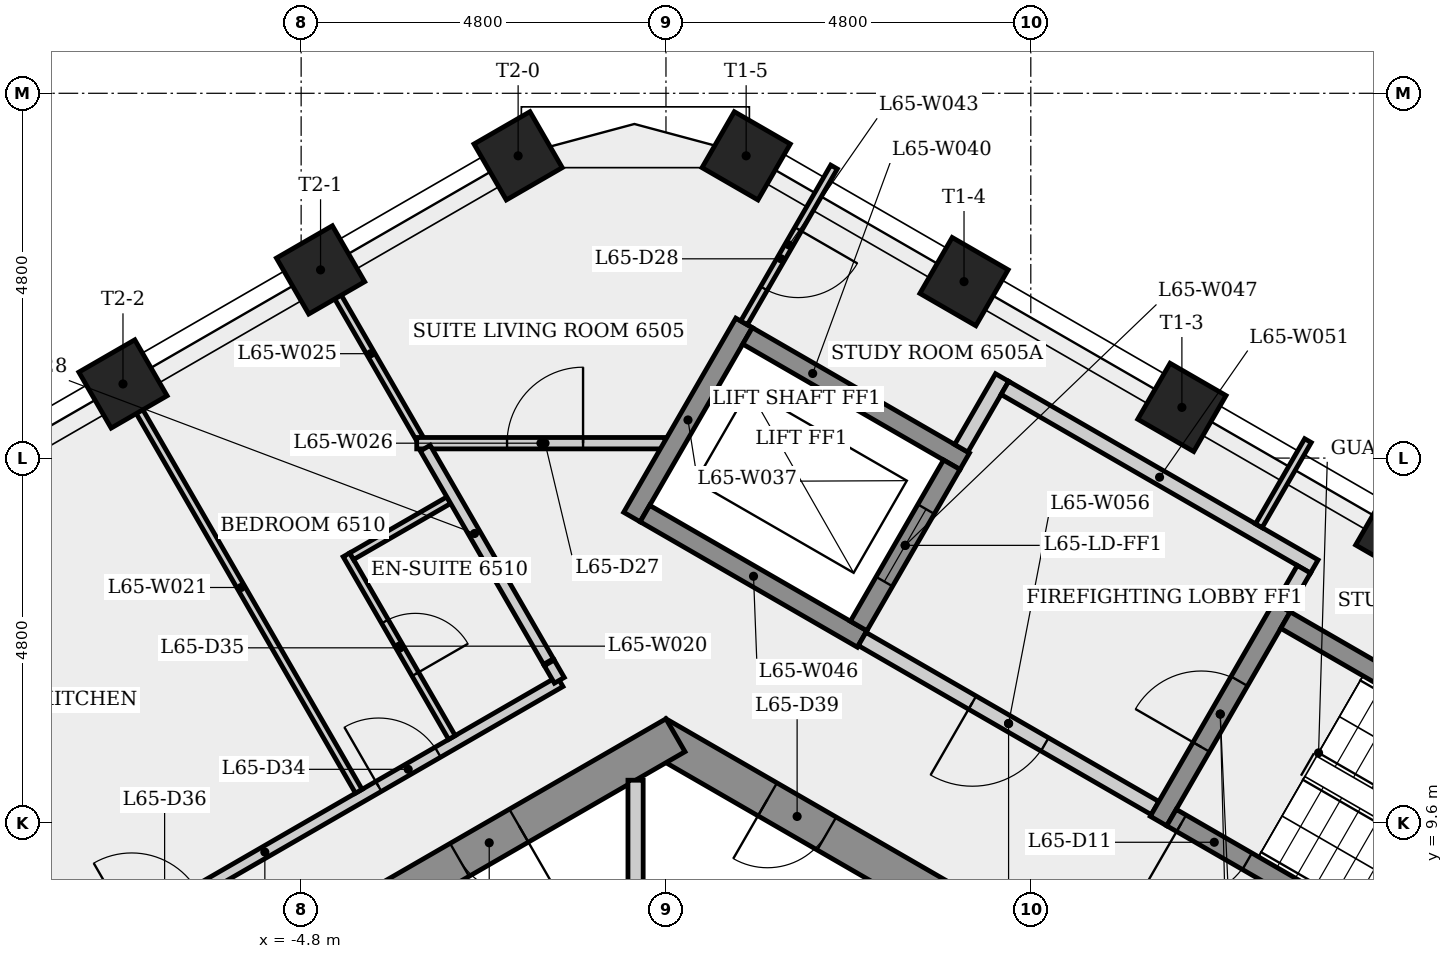
"""IFC4 building model, lengths in metres.
Left out: names, types, materials, properties, quantities, classifications, styles, units other than length and angle.
Written with IfcOpenShell. Run it as: python <this file> out.ifc"""

import sys

from ifc_helpers import new_model, si_unit, direction, frame, frame_2d, origin, origin_2d, place, context, subcontext, project, spatial, rectangle, extrude, element, fill, save


model = new_model("IFC4")
c1 = context("Model", 3, precision=1e-05, world=origin(), true_north=direction((0.0, 1.0)))
c2 = subcontext(c1, "Body", "Model", "MODEL_VIEW")
j1 = project(units=[si_unit("LENGTHUNIT", "METRE"), si_unit("PLANEANGLEUNIT", "RADIAN")], contexts=[c1])
p1 = place(None, origin())
s1 = spatial("IfcSite", under=j1, at=p1, CompositionType="ELEMENT")
p2 = place(p1, origin())
s2 = spatial("IfcBuilding", under=s1, at=p2, CompositionType="ELEMENT")
p3 = place(p2, frame((0.0, 0.0, 242.7)))
s3 = spatial("IfcBuildingStorey", under=s2, at=p3, CompositionType="ELEMENT", Elevation=242.7)
p4 = place(p3, frame((9.375, 5.268, 0.0), z_axis=(0.0, 0.0, 1.0), x_axis=(-0.866023993627, 0.500002442456, 0.0)))
e1 = element("IfcWall", 1, at=p4, inside=s3, PredefinedType="SHEAR", context=c2, shape_type="SweptSolid", body=[
    extrude(rectangle(XDim=10.97, YDim=0.5, at=frame_2d((5.485, 0.0))), origin(), (0.0, 0.0, 1.0), 3.4),
])
p5 = place(p4, frame((8.383, 0.0, 0.0)))
e2 = element("IfcOpeningElement", 2, at=p5, cuts=e1, PredefinedType="OPENING", context=c2, shape_type="SweptSolid", body=[
    extrude(rectangle(XDim=0.9, YDim=2.1, at=frame_2d((0.45, 1.05))), frame((0.0, 0.26, 0.0), z_axis=(0.0, -1.0, 0.0), x_axis=(1.0, 0.0, 0.0)), (0.0, 0.0, 1.0), 0.52),
])
p6 = place(p4, frame((3.165, 0.0, 0.0)))
e3 = element("IfcOpeningElement", 3, at=p6, cuts=e1, PredefinedType="OPENING", context=c2, shape_type="SweptSolid", body=[
    extrude(rectangle(XDim=0.9, YDim=2.1, at=frame_2d((0.45, 1.05))), frame((0.0, 0.26, 0.0), z_axis=(0.0, -1.0, 0.0), x_axis=(1.0, 0.0, 0.0)), (0.0, 0.0, 1.0), 0.52),
])
p7 = place(p3, frame((0.125, 10.753, 0.0), z_axis=(0.0, 0.0, 1.0), x_axis=(-0.866023993627, -0.500002442456, 0.0)))
e4 = element("IfcWall", 4, at=p7, inside=s3, PredefinedType="SHEAR", context=c2, shape_type="SweptSolid", body=[
    extrude(rectangle(XDim=10.97, YDim=0.5, at=frame_2d((5.485, 0.0))), origin(), (0.0, 0.0, 1.0), 3.4),
])
p8 = place(p7, frame((9.043, 0.0, 0.0)))
e5 = element("IfcOpeningElement", 5, at=p8, cuts=e4, PredefinedType="OPENING", context=c2, shape_type="SweptSolid", body=[
    extrude(rectangle(XDim=0.9, YDim=2.1, at=frame_2d((0.45, 1.05))), frame((0.0, 0.26, 0.0), z_axis=(0.0, -1.0, 0.0), x_axis=(1.0, 0.0, 0.0)), (0.0, 0.0, 1.0), 0.52),
])
p9 = place(p7, frame((2.38, 0.0, 0.0)))
e6 = element("IfcOpeningElement", 6, at=p9, cuts=e4, PredefinedType="OPENING", context=c2, shape_type="SweptSolid", body=[
    extrude(rectangle(XDim=0.9, YDim=2.1, at=frame_2d((0.45, 1.05))), frame((0.0, 0.26, 0.0), z_axis=(0.0, -1.0, 0.0), x_axis=(1.0, 0.0, 0.0)), (0.0, 0.0, 1.0), 0.52),
])
for number, where, z_axis, x_axis in (
    (7, (9.655, 13.412, 0.0), (0.0, 0.0, 1.0), (0.5, 0.866, 0.0)),
    (8, (6.788, 15.067, 0.0), (0.0, 0.0, 1.0), (0.5, 0.866, 0.0)),
    (9, (3.921, 16.722, 0.0), (0.0, 0.0, 1.0), (0.5, 0.866, 0.0)),
    (10, (1.055, 18.377, 0.0), (0.0, 0.0, 1.0), (0.5, 0.866, 0.0)),
    (11, (-1.945, 18.377, 0.0), (0.0, 0.0, 1.0), (-0.5, 0.866, 0.0)),
    (12, (-4.545, 16.876, 0.0), (0.0, 0.0, 1.0), (-0.5, 0.866, 0.0)),
    (13, (-7.144, 15.375, 0.0), (0.0, 0.0, 1.0), (-0.5, 0.866, 0.0)),
):
    element("IfcColumn", number, at=place(p3, frame(where, z_axis=z_axis, x_axis=x_axis)), inside=s3, PredefinedType="COLUMN", context=c2, shape_type="SweptSolid", body=[
        extrude(rectangle(XDim=0.85, YDim=0.85, at=origin_2d()), origin(), (0.0, 0.0, 1.0), 3.4),
    ])
p10 = place(p3, frame((-9.162, 6.973, 0.0), z_axis=(0.0, 0.0, 1.0), x_axis=(0.866025611375, 0.499999640442, 0.0)))
e14 = element("IfcWall", 14, at=p10, inside=s3, PredefinedType="PARTITIONING", context=c2, shape_type="SweptSolid", body=[
    extrude(rectangle(XDim=8.971, YDim=0.15, at=frame_2d((4.486, 0.0))), origin(), (0.0, 0.0, 1.0), 3.05),
])
p11 = place(p10, frame((6.213, 0.0, 0.0)))
e15 = element("IfcOpeningElement", 15, at=p11, cuts=e14, PredefinedType="OPENING", context=c2, shape_type="SweptSolid", body=[
    extrude(rectangle(XDim=0.9, YDim=2.1, at=frame_2d((0.45, 1.05))), frame((0.0, 0.085, 0.0), z_axis=(0.0, -1.0, 0.0), x_axis=(1.0, 0.0, 0.0)), (0.0, 0.0, 1.0), 0.17),
])
p12 = place(p10, frame((2.463, 0.0, 0.0)))
e16 = element("IfcOpeningElement", 16, at=p12, cuts=e14, PredefinedType="OPENING", context=c2, shape_type="SweptSolid", body=[
    extrude(rectangle(XDim=1.0, YDim=2.1, at=frame_2d((0.5, 1.05))), frame((0.0, 0.085, 0.0), z_axis=(0.0, -1.0, 0.0), x_axis=(1.0, 0.0, 0.0)), (0.0, 0.0, 1.0), 0.17),
])
p13 = place(p3, frame((-4.204, 13.127, 0.0), z_axis=(0.0, 0.0, 1.0), x_axis=(0.50000932403, -0.866020020486, 0.0)))
e17 = element("IfcWall", 17, at=p13, inside=s3, PredefinedType="PARTITIONING", context=c2, shape_type="SweptSolid", body=[
    extrude(rectangle(XDim=2.775, YDim=0.1, at=frame_2d((1.387, 0.0))), origin(), (0.0, 0.0, 1.0), 3.05),
])
p14 = place(p13, frame((1.012, 0.0, 0.0)))
e18 = element("IfcOpeningElement", 18, at=p14, cuts=e17, PredefinedType="OPENING", context=c2, shape_type="SweptSolid", body=[
    extrude(rectangle(XDim=0.8, YDim=2.1, at=frame_2d((0.4, 1.05))), frame((0.0, 0.06, 0.0), z_axis=(0.0, -1.0, 0.0), x_axis=(1.0, 0.0, 0.0)), (0.0, 0.0, 1.0), 0.12),
])
p15 = place(p3, frame((-4.042, 10.016, 0.0), z_axis=(0.0, 0.0, 1.0), x_axis=(-0.500027320894, 0.866009629484, 0.0)))
e19 = element("IfcWall", 19, at=p15, inside=s3, PredefinedType="PARTITIONING", context=c2, shape_type="SweptSolid", body=[
    extrude(rectangle(XDim=6.193, YDim=0.1, at=frame_2d((3.096, 0.0))), origin(), (0.0, 0.0, 1.0), 3.05),
])
p16 = place(p3, frame((-3.242, 14.661, 0.0), z_axis=(0.0, 0.0, 1.0), x_axis=(-0.499991089772, 0.866030548046, 0.0)))
e20 = element("IfcWall", 20, at=p16, inside=s3, PredefinedType="PARTITIONING", context=c2, shape_type="SweptSolid", body=[
    extrude(rectangle(XDim=2.57, YDim=0.1, at=frame_2d((1.285, 0.0))), origin(), (0.0, 0.0, 1.0), 3.05),
])
p17 = place(p3, frame((-3.279, 14.596, 0.0), z_axis=(0.0, 0.0, 1.0), x_axis=(1.0, 0.0, 0.0)))
e21 = element("IfcWall", 21, at=p17, inside=s3, PredefinedType="PARTITIONING", context=c2, shape_type="SweptSolid", body=[
    extrude(rectangle(XDim=3.268, YDim=0.15, at=frame_2d((1.634, 0.0))), origin(), (0.0, 0.0, 1.0), 3.05),
])
p18 = place(p17, frame((1.189, 0.0, 0.0)))
e22 = element("IfcOpeningElement", 22, at=p18, cuts=e21, PredefinedType="OPENING", context=c2, shape_type="SweptSolid", body=[
    extrude(rectangle(XDim=1.0, YDim=2.1, at=frame_2d((0.5, 1.05))), frame((0.0, 0.085, 0.0), z_axis=(0.0, -1.0, 0.0), x_axis=(1.0, 0.0, 0.0)), (0.0, 0.0, 1.0), 0.17),
])
p19 = place(p3, frame((-2.858, 13.846, 0.0), z_axis=(0.0, 0.0, 1.0), x_axis=(-0.866003658127, -0.500037662692, 0.0)))
e23 = element("IfcWall", 23, at=p19, inside=s3, PredefinedType="PARTITIONING", context=c2, shape_type="SweptSolid", body=[
    extrude(rectangle(XDim=1.475, YDim=0.1, at=frame_2d((0.738, 0.0))), origin(), (0.0, 0.0, 1.0), 3.05),
])
p20 = place(p3, frame((-3.167, 14.531, 0.0), z_axis=(0.0, 0.0, 1.0), x_axis=(0.500017912207, -0.86601506192, 0.0)))
e24 = element("IfcWall", 24, at=p20, inside=s3, PredefinedType="PARTITIONING", context=c2, shape_type="SweptSolid", body=[
    extrude(rectangle(XDim=3.243, YDim=0.15, at=frame_2d((1.621, 0.0))), origin(), (0.0, 0.0, 1.0), 3.05),
])
p21 = place(p3, frame((-1.536, 11.706, 0.0), z_axis=(0.0, 0.0, 1.0), x_axis=(0.500200859313, -0.865909406545, 0.0)))
e25 = element("IfcWall", 25, at=p21, inside=s3, PredefinedType="PARTITIONING", context=c2, shape_type="SweptSolid", body=[
    extrude(rectangle(XDim=0.265, YDim=0.15, at=frame_2d((0.133, 0.0))), origin(), (0.0, 0.0, 1.0), 3.05),
])
p22 = place(p3, frame((-0.4, 10.161, 0.0), z_axis=(0.0, 0.0, 1.0), x_axis=(0.0, -1.0, 0.0)))
e26 = element("IfcWall", 26, at=p22, inside=s3, PredefinedType="PARTITIONING", context=c2, shape_type="SweptSolid", body=[
    extrude(rectangle(XDim=4.886, YDim=0.2, at=frame_2d((2.443, 0.0))), origin(), (0.0, 0.0, 1.0), 3.05),
])
p23 = place(p3, frame((-0.448, 13.624, 0.0), z_axis=(0.0, 0.0, 1.0), x_axis=(0.500037662692, 0.866003658127, 0.0)))
e27 = element("IfcWall", 27, at=p23, inside=s3, PredefinedType="SHEAR", context=c2, shape_type="SweptSolid", body=[
    extrude(rectangle(XDim=2.95, YDim=0.25, at=frame_2d((1.475, 0.0))), origin(), (0.0, 0.0, 1.0), 3.05),
])
p24 = place(p3, frame((1.073, 16.008, 0.0), z_axis=(0.0, 0.0, 1.0), x_axis=(0.866040211805, -0.499974350878, 0.0)))
e28 = element("IfcWall", 28, at=p24, inside=s3, PredefinedType="SHEAR", context=c2, shape_type="SweptSolid", body=[
    extrude(rectangle(XDim=3.3, YDim=0.25, at=frame_2d((1.65, 0.0))), origin(), (0.0, 0.0, 1.0), 3.05),
])
p25 = place(p3, frame((2.211, 18.23, 0.0), z_axis=(0.0, 0.0, 1.0), x_axis=(-0.50001992892, -0.866013897511, 0.0)))
e29 = element("IfcWall", 29, at=p25, inside=s3, PredefinedType="PARTITIONING", context=c2, shape_type="SweptSolid", body=[
    extrude(rectangle(XDim=2.368, YDim=0.1, at=frame_2d((1.184, 0.0))), origin(), (0.0, 0.0, 1.0), 3.05),
])
p26 = place(p25, frame((0.945, 0.0, 0.0)))
e30 = element("IfcOpeningElement", 30, at=p26, cuts=e29, PredefinedType="OPENING", context=c2, shape_type="SweptSolid", body=[
    extrude(rectangle(XDim=0.9, YDim=2.1, at=frame_2d((0.45, 1.05))), frame((0.0, 0.06, 0.0), z_axis=(0.0, -1.0, 0.0), x_axis=(1.0, 0.0, 0.0)), (0.0, 0.0, 1.0), 0.12),
])
p27 = place(p3, frame((2.581, 12.02, 0.0), z_axis=(0.0, 0.0, 1.0), x_axis=(-0.866040211805, 0.499974350878, 0.0)))
e31 = element("IfcWall", 31, at=p27, inside=s3, PredefinedType="SHEAR", context=c2, shape_type="SweptSolid", body=[
    extrude(rectangle(XDim=3.3, YDim=0.25, at=frame_2d((1.65, 0.0))), origin(), (0.0, 0.0, 1.0), 3.05),
])
p28 = place(p3, frame((2.535, 12.191, 0.0), z_axis=(0.0, 0.0, 1.0), x_axis=(0.500061746146, 0.865989751695, 0.0)))
e32 = element("IfcWall", 32, at=p28, inside=s3, PredefinedType="SHEAR", context=c2, shape_type="SweptSolid", body=[
    extrude(rectangle(XDim=2.45, YDim=0.25, at=frame_2d((1.225, 0.0))), origin(), (0.0, 0.0, 1.0), 3.4),
])
p29 = place(p28, frame((0.675, 0.0, 0.0)))
e33 = element("IfcOpeningElement", 33, at=p29, cuts=e32, PredefinedType="OPENING", context=c2, shape_type="SweptSolid", body=[
    extrude(rectangle(XDim=1.1, YDim=2.1, at=frame_2d((0.55, 1.05))), frame((0.0, 0.135, 0.0), z_axis=(0.0, -1.0, 0.0), x_axis=(1.0, 0.0, 0.0)), (0.0, 0.0, 1.0), 0.27),
])
p30 = place(p3, frame((3.885, 14.529, 0.0), z_axis=(0.0, 0.0, 1.0), x_axis=(0.499997628298, 0.866026773083, 0.0)))
e34 = element("IfcWall", 34, at=p30, inside=s3, PredefinedType="PARTITIONING", context=c2, shape_type="SweptSolid", body=[
    extrude(rectangle(XDim=1.075, YDim=0.2, at=frame_2d((0.538, 0.0))), origin(), (0.0, 0.0, 1.0), 3.05),
])
p31 = place(p3, frame((4.459, 15.323, 0.0), z_axis=(0.0, 0.0, 1.0), x_axis=(0.866016039709, -0.500016218704, 0.0)))
e35 = element("IfcWall", 35, at=p31, inside=s3, PredefinedType="PARTITIONING", context=c2, shape_type="SweptSolid", body=[
    extrude(rectangle(XDim=4.7, YDim=0.2, at=frame_2d((2.35, 0.0))), origin(), (0.0, 0.0, 1.0), 3.05),
])
p32 = place(p3, frame((6.435, 9.795, 0.0), z_axis=(0.0, 0.0, 1.0), x_axis=(-0.866012907634, 0.500021643343, 0.0)))
e36 = element("IfcWall", 36, at=p32, inside=s3, PredefinedType="PARTITIONING", context=c2, shape_type="SweptSolid", body=[
    extrude(rectangle(XDim=4.45, YDim=0.2, at=frame_2d((2.225, 0.0))), origin(), (0.0, 0.0, 1.0), 3.05),
])
p33 = place(p32, frame((1.675, 0.0, 0.0)))
e37 = element("IfcOpeningElement", 37, at=p33, cuts=e36, PredefinedType="OPENING", context=c2, shape_type="SweptSolid", body=[
    extrude(rectangle(XDim=1.1, YDim=2.1, at=frame_2d((0.55, 1.05))), frame((0.0, 0.11, 0.0), z_axis=(0.0, -1.0, 0.0), x_axis=(1.0, 0.0, 0.0)), (0.0, 0.0, 1.0), 0.22),
])
p34 = place(p3, frame((6.48, 9.624, 0.0), z_axis=(0.0, 0.0, 1.0), x_axis=(0.500017246033, 0.866015446554, 0.0)))
e38 = element("IfcWall", 38, at=p34, inside=s3, PredefinedType="SHEAR", context=c2, shape_type="SweptSolid", body=[
    extrude(rectangle(XDim=3.25, YDim=0.25, at=frame_2d((1.625, 0.0))), origin(), (0.0, 0.0, 1.0), 3.05),
])
p35 = place(p34, frame((1.125, 0.0, 0.0)))
e39 = element("IfcOpeningElement", 39, at=p35, cuts=e38, PredefinedType="OPENING", context=c2, shape_type="SweptSolid", body=[
    extrude(rectangle(XDim=1.0, YDim=2.1, at=frame_2d((0.5, 1.05))), frame((0.0, 0.135, 0.0), z_axis=(0.0, -1.0, 0.0), x_axis=(1.0, 0.0, 0.0)), (0.0, 0.0, 1.0), 0.27),
])
p36 = place(p3, frame((7.8, 13.51, 0.0), z_axis=(0.0, 0.0, 1.0), x_axis=(0.499956713172, 0.866050394004, 0.0)))
e40 = element("IfcWall", 40, at=p36, inside=s3, PredefinedType="PARTITIONING", context=c2, shape_type="SweptSolid", body=[
    extrude(rectangle(XDim=1.293, YDim=0.1, at=frame_2d((0.646, 0.0))), origin(), (0.0, 0.0, 1.0), 3.05),
])
p37 = place(p3, frame((8.151, 12.268, 0.0), z_axis=(0.0, 0.0, 1.0), x_axis=(0.866025499775, -0.499999833739, 0.0)))
e41 = element("IfcWall", 41, at=p37, inside=s3, PredefinedType="SHEAR", context=c2, shape_type="SweptSolid", body=[
    extrude(rectangle(XDim=6.4, YDim=0.25, at=frame_2d((3.2, 0.0))), origin(), (0.0, 0.0, 1.0), 3.05),
])
p38 = place(p3, frame((8.393, 12.937, 0.0), z_axis=(0.0, 0.0, 1.0), x_axis=(-0.500065409566, -0.86598763626, 0.0)))
e42 = element("IfcWall", 42, at=p38, inside=s3, PredefinedType="PARTITIONING", context=c2, shape_type="SweptSolid", body=[
    extrude(rectangle(XDim=0.575, YDim=0.2, at=frame_2d((0.288, 0.0))), origin(), (0.0, 0.0, 1.0), 3.05),
])
p39 = place(p3, frame((12.194, 6.47, 0.0), z_axis=(0.0, 0.0, 1.0), x_axis=(-0.866025499775, 0.499999833739, 0.0)))
e43 = element("IfcWall", 43, at=p39, inside=s3, PredefinedType="SHEAR", context=c2, shape_type="SweptSolid", body=[
    extrude(rectangle(XDim=6.4, YDim=0.25, at=frame_2d((3.2, 0.0))), origin(), (0.0, 0.0, 1.0), 3.05),
])
p40 = place(p39, frame((5.25, 0.0, 0.0)))
e44 = element("IfcOpeningElement", 44, at=p40, cuts=e43, PredefinedType="OPENING", context=c2, shape_type="SweptSolid", body=[
    extrude(rectangle(XDim=1.0, YDim=2.1, at=frame_2d((0.5, 1.05))), frame((0.0, 0.135, 0.0), z_axis=(0.0, -1.0, 0.0), x_axis=(1.0, 0.0, 0.0)), (0.0, 0.0, 1.0), 0.27),
])
p41 = place(p40, origin())
e45 = element("IfcDoor", 45, at=p41, inside=s3, OperationType="SINGLE_SWING_RIGHT", PredefinedType="DOOR", context=c2, shape_type="SweptSolid", body=[
    extrude(rectangle(XDim=1.0, YDim=2.1, at=frame_2d((0.5, 1.05))), frame((0.0, 0.025, 0.0), z_axis=(0.0, -1.0, 0.0), x_axis=(1.0, 0.0, 0.0)), (0.0, 0.0, 1.0), 0.05),
])
fill(e44, e45)
p42 = place(p35, origin())
e46 = element("IfcDoor", 46, at=p42, inside=s3, OperationType="SINGLE_SWING_LEFT", PredefinedType="DOOR", context=c2, shape_type="SweptSolid", body=[
    extrude(rectangle(XDim=1.0, YDim=2.1, at=frame_2d((0.5, 1.05))), frame((0.0, 0.025, 0.0), z_axis=(0.0, -1.0, 0.0), x_axis=(1.0, 0.0, 0.0)), (0.0, 0.0, 1.0), 0.05),
])
fill(e39, e46)
p43 = place(p33, origin())
e47 = element("IfcDoor", 47, at=p43, inside=s3, OperationType="SINGLE_SWING_RIGHT", PredefinedType="DOOR", context=c2, shape_type="SweptSolid", body=[
    extrude(rectangle(XDim=1.1, YDim=2.1, at=frame_2d((0.55, 1.05))), frame((0.0, 0.025, 0.0), z_axis=(0.0, -1.0, 0.0), x_axis=(1.0, 0.0, 0.0)), (0.0, 0.0, 1.0), 0.05),
])
fill(e37, e47)
p44 = place(p29, origin())
e48 = element("IfcDoor", 48, at=p44, inside=s3, OperationType="SLIDING_TO_LEFT", PredefinedType="DOOR", context=c2, shape_type="SweptSolid", body=[
    extrude(rectangle(XDim=1.1, YDim=2.1, at=frame_2d((0.55, 1.05))), frame((0.0, 0.025, 0.0), z_axis=(0.0, -1.0, 0.0), x_axis=(1.0, 0.0, 0.0)), (0.0, 0.0, 1.0), 0.05),
])
fill(e33, e48)
p45 = place(p18, origin())
e49 = element("IfcDoor", 49, at=p45, inside=s3, OperationType="SINGLE_SWING_RIGHT", PredefinedType="DOOR", context=c2, shape_type="SweptSolid", body=[
    extrude(rectangle(XDim=1.0, YDim=2.1, at=frame_2d((0.5, 1.05))), frame((0.0, 0.025, 0.0), z_axis=(0.0, -1.0, 0.0), x_axis=(1.0, 0.0, 0.0)), (0.0, 0.0, 1.0), 0.05),
])
fill(e22, e49)
p46 = place(p26, origin())
e50 = element("IfcDoor", 50, at=p46, inside=s3, OperationType="SINGLE_SWING_LEFT", PredefinedType="DOOR", context=c2, shape_type="SweptSolid", body=[
    extrude(rectangle(XDim=0.9, YDim=2.1, at=frame_2d((0.45, 1.05))), frame((0.0, 0.025, 0.0), z_axis=(0.0, -1.0, 0.0), x_axis=(1.0, 0.0, 0.0)), (0.0, 0.0, 1.0), 0.05),
])
fill(e30, e50)
p47 = place(p11, origin())
e51 = element("IfcDoor", 51, at=p47, inside=s3, OperationType="SINGLE_SWING_LEFT", PredefinedType="DOOR", context=c2, shape_type="SweptSolid", body=[
    extrude(rectangle(XDim=0.9, YDim=2.1, at=frame_2d((0.45, 1.05))), frame((0.0, 0.025, 0.0), z_axis=(0.0, -1.0, 0.0), x_axis=(1.0, 0.0, 0.0)), (0.0, 0.0, 1.0), 0.05),
])
fill(e15, e51)
p48 = place(p14, origin())
e52 = element("IfcDoor", 52, at=p48, inside=s3, OperationType="SINGLE_SWING_RIGHT", PredefinedType="DOOR", context=c2, shape_type="SweptSolid", body=[
    extrude(rectangle(XDim=0.8, YDim=2.1, at=frame_2d((0.4, 1.05))), frame((0.0, 0.025, 0.0), z_axis=(0.0, -1.0, 0.0), x_axis=(1.0, 0.0, 0.0)), (0.0, 0.0, 1.0), 0.05),
])
fill(e18, e52)
p49 = place(p9, origin())
e53 = element("IfcDoor", 53, at=p49, inside=s3, OperationType="SINGLE_SWING_LEFT", PredefinedType="DOOR", context=c2, shape_type="SweptSolid", body=[
    extrude(rectangle(XDim=0.9, YDim=2.1, at=frame_2d((0.45, 1.05))), frame((0.0, 0.025, 0.0), z_axis=(0.0, -1.0, 0.0), x_axis=(1.0, 0.0, 0.0)), (0.0, 0.0, 1.0), 0.05),
])
fill(e6, e53)
p50 = place(p5, origin())
e54 = element("IfcDoor", 54, at=p50, inside=s3, OperationType="SINGLE_SWING_RIGHT", PredefinedType="DOOR", context=c2, shape_type="SweptSolid", body=[
    extrude(rectangle(XDim=0.9, YDim=2.1, at=frame_2d((0.45, 1.05))), frame((0.0, 0.025, 0.0), z_axis=(0.0, -1.0, 0.0), x_axis=(1.0, 0.0, 0.0)), (0.0, 0.0, 1.0), 0.05),
])
fill(e2, e54)
save(model, sys.argv[1])
